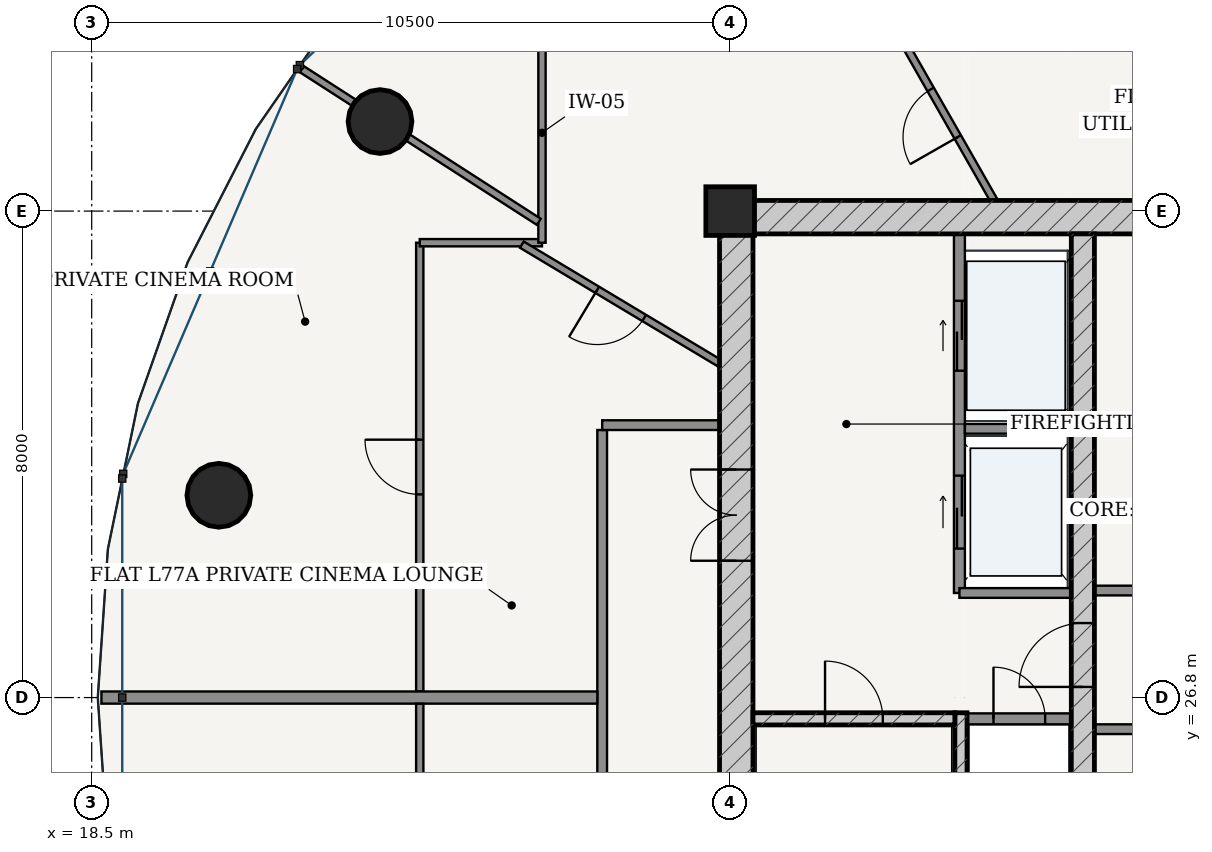
"""IFC4 building model, lengths in metres.
Left out: names, types, materials, properties, quantities, classifications, styles, units other than length and angle.
Written with IfcOpenShell. Run it as: python <this file> out.ifc"""

import sys

from ifc_helpers import new_model, si_unit, direction, frame, frame_2d, origin, origin_2d, place, context, subcontext, project, spatial, rectangle, hollow_circle, extrude, source, transform, mapped, element, fill, save


model = new_model("IFC4")
c1 = context("Model", 3, precision=1e-05, world=origin(), true_north=direction((-0.2419218956, 0.970295726276)))
c2 = subcontext(c1, "Body", "Model", "MODEL_VIEW")
j1 = project(units=[si_unit("LENGTHUNIT", "METRE"), si_unit("PLANEANGLEUNIT", "RADIAN")], contexts=[c1])
p1 = place(None, origin())
s1 = spatial("IfcSite", under=j1, at=p1, CompositionType="ELEMENT")
p2 = place(p1, origin())
s2 = spatial("IfcBuilding", under=s1, at=p2, CompositionType="ELEMENT")
p3 = place(p2, frame((0.0, 0.0, 293.2)))
s3 = spatial("IfcBuildingStorey", under=s2, at=p3, CompositionType="ELEMENT", Elevation=293.2)
p4 = place(p3, frame((29.0, 34.8, 0.0), z_axis=(0.0, 0.0, 1.0), x_axis=(1.0, 0.0, 0.0)))
e1 = element("IfcColumn", 1, at=p4, inside=s3, PredefinedType="COLUMN", context=c2, shape_type="SweptSolid", body=[
    extrude(rectangle(XDim=0.8, YDim=0.8, at=origin_2d()), origin(), (0.0, 0.0, 1.0), 3.75),
])
p5 = place(p3, frame((28.825, 34.7, 0.0), z_axis=(0.0, 0.0, 1.0), x_axis=(1.0, 0.0, 0.0)))
e2 = element("IfcWall", 2, at=p5, inside=s3, PredefinedType="SHEAR", context=c2, shape_type="SweptSolid", body=[
    extrude(rectangle(XDim=18.35, YDim=0.55, at=frame_2d((9.175, 0.0))), origin(), (0.0, 0.0, 1.0), 3.49),
])
p6 = place(p3, frame((29.1, 19.175, 0.0), z_axis=(0.0, 0.0, 1.0), x_axis=(0.0, 1.0, 0.0)))
e3 = element("IfcWall", 3, at=p6, inside=s3, PredefinedType="SHEAR", context=c2, shape_type="SweptSolid", body=[
    extrude(rectangle(XDim=15.25, YDim=0.55, at=frame_2d((7.625, 0.0))), origin(), (0.0, 0.0, 1.0), 3.49),
])
p7 = place(p6, frame((9.875, 0.0, 0.0)))
e4 = element("IfcOpeningElement", 4, at=p7, cuts=e3, PredefinedType="OPENING", context=c2, shape_type="SweptSolid", body=[
    extrude(rectangle(XDim=1.5, YDim=2.2, at=frame_2d((0.75, 1.1))), frame((0.0, 0.285, 0.0), z_axis=(0.0, -1.0, 0.0), x_axis=(1.0, 0.0, 0.0)), (0.0, 0.0, 1.0), 0.57),
])
p8 = place(p3, frame((32.795, 19.175, 0.0), z_axis=(0.0, 0.0, 1.0), x_axis=(0.0, 1.0, 0.0)))
e5 = element("IfcWall", 5, at=p8, inside=s3, PredefinedType="SOLIDWALL", context=c2, shape_type="SweptSolid", body=[
    extrude(rectangle(XDim=7.375, YDim=0.2, at=frame_2d((3.688, 0.0))), origin(), (0.0, 0.0, 1.0), 3.49),
])
p9 = place(p3, frame((29.375, 26.45, 0.0), z_axis=(0.0, 0.0, 1.0), x_axis=(1.0, 0.0, 0.0)))
e6 = element("IfcWall", 6, at=p9, inside=s3, PredefinedType="SOLIDWALL", context=c2, shape_type="SweptSolid", body=[
    extrude(rectangle(XDim=3.32, YDim=0.2, at=frame_2d((1.66, 0.0))), origin(), (0.0, 0.0, 1.0), 3.49),
])
p10 = place(p9, frame((1.185, 0.0, 0.0)))
e7 = element("IfcOpeningElement", 7, at=p10, cuts=e6, PredefinedType="OPENING", context=c2, shape_type="SweptSolid", body=[
    extrude(rectangle(XDim=0.95, YDim=2.15, at=frame_2d((0.475, 1.075))), frame((0.0, 0.11, 0.0), z_axis=(0.0, -1.0, 0.0), x_axis=(1.0, 0.0, 0.0)), (0.0, 0.0, 1.0), 0.22),
])
p11 = place(p3, frame((34.8, 19.175, 0.0), z_axis=(0.0, 0.0, 1.0), x_axis=(0.0, 1.0, 0.0)))
e8 = element("IfcWall", 8, at=p11, inside=s3, PredefinedType="SHEAR", context=c2, shape_type="SweptSolid", body=[
    extrude(rectangle(XDim=15.25, YDim=0.38, at=frame_2d((7.625, 0.0))), origin(), (0.0, 0.0, 1.0), 3.49),
])
p12 = place(p11, frame((7.8, 0.0, 0.0)))
e9 = element("IfcOpeningElement", 9, at=p12, cuts=e8, PredefinedType="OPENING", context=c2, shape_type="SweptSolid", body=[
    extrude(rectangle(XDim=1.05, YDim=2.15, at=frame_2d((0.525, 1.075))), frame((0.0, 0.2, 0.0), z_axis=(0.0, -1.0, 0.0), x_axis=(1.0, 0.0, 0.0)), (0.0, 0.0, 1.0), 0.4),
])
for number, where, z_axis, x_axis in (
    (10, (23.241, 36.272, 0.0), (0.0, 0.0, 1.0), (1.0, 0.0, 0.0)),
    (11, (20.591, 30.126, 0.0), (0.0, 0.0, 1.0), (1.0, 0.0, 0.0)),
):
    element("IfcColumn", number, at=place(p3, frame(where, z_axis=z_axis, x_axis=x_axis)), inside=s3, PredefinedType="COLUMN", context=c2, shape_type="SweptSolid", body=[
        extrude(hollow_circle(Radius=0.525, WallThickness=0.035, at=origin_2d()), origin(), (0.0, 0.0, 1.0), 3.75),
    ])
p13 = place(p3, frame((32.9, 26.45, 0.0), z_axis=(0.0, 0.0, 1.0), x_axis=(1.0, 0.0, 0.0)))
e12 = element("IfcWall", 12, at=p13, inside=s3, PredefinedType="PARTITIONING", context=c2, shape_type="SweptSolid", body=[
    extrude(rectangle(XDim=1.71, YDim=0.18, at=frame_2d((0.855, 0.0))), origin(), (0.0, 0.0, 1.0), 3.49),
])
p14 = place(p13, frame((0.43, 0.0, 0.0)))
e13 = element("IfcOpeningElement", 13, at=p14, cuts=e12, PredefinedType="OPENING", context=c2, shape_type="SweptSolid", body=[
    extrude(rectangle(XDim=0.85, YDim=2.1, at=frame_2d((0.425, 1.05))), frame((0.0, 0.1, 0.0), z_axis=(0.0, -1.0, 0.0), x_axis=(1.0, 0.0, 0.0)), (0.0, 0.0, 1.0), 0.2),
])
p15 = place(p3, frame((32.77, 28.52, 0.0), z_axis=(0.0, 0.0, 1.0), x_axis=(0.0, 1.0, 0.0)))
e14 = element("IfcWall", 14, at=p15, inside=s3, PredefinedType="PARTITIONING", context=c2, shape_type="SweptSolid", body=[
    extrude(rectangle(XDim=5.905, YDim=0.18, at=frame_2d((2.953, 0.0))), origin(), (0.0, 0.0, 1.0), 3.49),
])
p16 = place(p15, frame((3.655, 0.0, 0.0)))
e15 = element("IfcOpeningElement", 15, at=p16, cuts=e14, PredefinedType="OPENING", context=c2, shape_type="SweptSolid", body=[
    extrude(rectangle(XDim=1.15, YDim=2.2, at=frame_2d((0.575, 1.1))), frame((0.0, 0.1, 0.0), z_axis=(0.0, -1.0, 0.0), x_axis=(1.0, 0.0, 0.0)), (0.0, 0.0, 1.0), 0.2),
])
p17 = place(p15, frame((0.73, 0.0, 0.0)))
e16 = element("IfcOpeningElement", 16, at=p17, cuts=e14, PredefinedType="OPENING", context=c2, shape_type="SweptSolid", body=[
    extrude(rectangle(XDim=1.2, YDim=2.25, at=frame_2d((0.6, 1.125))), frame((0.0, 0.1, 0.0), z_axis=(0.0, -1.0, 0.0), x_axis=(1.0, 0.0, 0.0)), (0.0, 0.0, 1.0), 0.2),
])
p18 = place(p3, frame((32.86, 31.22, 0.0), z_axis=(0.0, 0.0, 1.0), x_axis=(1.0, 0.0, 0.0)))
e17 = element("IfcWall", 17, at=p18, inside=s3, PredefinedType="PARTITIONING", context=c2, shape_type="SweptSolid", body=[
    extrude(rectangle(XDim=1.75, YDim=0.16, at=frame_2d((0.875, 0.0))), origin(), (0.0, 0.0, 1.0), 3.49),
])
p19 = place(p3, frame((32.77, 28.52, 0.0), z_axis=(0.0, 0.0, 1.0), x_axis=(1.0, 0.0, 0.0)))
e18 = element("IfcWall", 18, at=p19, inside=s3, PredefinedType="PARTITIONING", context=c2, shape_type="SweptSolid", body=[
    extrude(rectangle(XDim=1.84, YDim=0.16, at=frame_2d((0.92, 0.0))), origin(), (0.0, 0.0, 1.0), 3.49),
])
p20 = place(p3, frame((34.99, 28.56, 0.0), z_axis=(0.0, 0.0, 1.0), x_axis=(1.0, 0.0, 0.0)))
e19 = element("IfcWall", 19, at=p20, inside=s3, PredefinedType="PARTITIONING", context=c2, shape_type="SweptSolid", body=[
    extrude(rectangle(XDim=6.02, YDim=0.16, at=frame_2d((3.01, 0.0))), origin(), (0.0, 0.0, 1.0), 3.49),
])
p21 = place(p20, frame((2.585, 0.0, 0.0)))
e20 = element("IfcOpeningElement", 20, at=p21, cuts=e19, PredefinedType="OPENING", context=c2, shape_type="SweptSolid", body=[
    extrude(rectangle(XDim=0.85, YDim=2.1, at=frame_2d((0.425, 1.05))), frame((0.0, 0.09, 0.0), z_axis=(0.0, -1.0, 0.0), x_axis=(1.0, 0.0, 0.0)), (0.0, 0.0, 1.0), 0.18),
])
p22 = place(p3, frame((34.99, 26.28, 0.0), z_axis=(0.0, 0.0, 1.0), x_axis=(1.0, 0.0, 0.0)))
e21 = element("IfcWall", 21, at=p22, inside=s3, PredefinedType="PARTITIONING", context=c2, shape_type="SweptSolid", body=[
    extrude(rectangle(XDim=6.02, YDim=0.16, at=frame_2d((3.01, 0.0))), origin(), (0.0, 0.0, 1.0), 3.49),
])
p23 = place(p22, frame((1.045, 0.0, 0.0)))
e22 = element("IfcOpeningElement", 22, at=p23, cuts=e21, PredefinedType="OPENING", context=c2, shape_type="SweptSolid", body=[
    extrude(rectangle(XDim=0.85, YDim=2.1, at=frame_2d((0.425, 1.05))), frame((0.0, 0.09, 0.0), z_axis=(0.0, -1.0, 0.0), x_axis=(1.0, 0.0, 0.0)), (0.0, 0.0, 1.0), 0.18),
])
p24 = place(p22, frame((3.215, 0.0, 0.0)))
e23 = element("IfcOpeningElement", 23, at=p24, cuts=e21, PredefinedType="OPENING", context=c2, shape_type="SweptSolid", body=[
    extrude(rectangle(XDim=1.1, YDim=2.2, at=frame_2d((0.55, 1.1))), frame((0.0, 0.09, 0.0), z_axis=(0.0, -1.0, 0.0), x_axis=(1.0, 0.0, 0.0)), (0.0, 0.0, 1.0), 0.18),
])
p25 = place(p22, frame((4.695, 0.0, 0.0)))
e24 = element("IfcOpeningElement", 24, at=p25, cuts=e21, PredefinedType="OPENING", context=c2, shape_type="SweptSolid", body=[
    extrude(rectangle(XDim=1.1, YDim=2.2, at=frame_2d((0.55, 1.1))), frame((0.0, 0.09, 0.0), z_axis=(0.0, -1.0, 0.0), x_axis=(1.0, 0.0, 0.0)), (0.0, 0.0, 1.0), 0.18),
])
p26 = place(p3, frame((26.895, 17.275, 0.0), z_axis=(0.0, 0.0, 1.0), x_axis=(0.0, 1.0, 0.0)))
e25 = element("IfcWall", 25, at=p26, inside=s3, PredefinedType="PARTITIONING", context=c2, shape_type="SweptSolid", body=[
    extrude(rectangle(XDim=13.925, YDim=0.16, at=frame_2d((6.962, 0.0))), origin(), (0.0, 0.0, 1.0), 3.015),
])
p27 = place(p3, frame((26.895, 31.28, 0.0), z_axis=(0.0, 0.0, 1.0), x_axis=(1.0, 0.0, 0.0)))
e26 = element("IfcWall", 26, at=p27, inside=s3, PredefinedType="PARTITIONING", context=c2, shape_type="SweptSolid", body=[
    extrude(rectangle(XDim=1.93, YDim=0.16, at=frame_2d((0.965, 0.0))), origin(), (0.0, 0.0, 1.0), 3.49),
])
p28 = place(p3, frame((23.895, 26.902, 0.0), z_axis=(0.0, 0.0, 1.0), x_axis=(0.0, 1.0, 0.0)))
e27 = element("IfcWall", 27, at=p28, inside=s3, PredefinedType="PARTITIONING", context=c2, shape_type="SweptSolid", body=[
    extrude(rectangle(XDim=7.378, YDim=0.12, at=frame_2d((3.689, 0.0))), origin(), (0.0, 0.0, 1.0), 3.015),
])
p29 = place(p28, frame((3.239, 0.0, 0.0)))
e28 = element("IfcOpeningElement", 28, at=p29, cuts=e27, PredefinedType="OPENING", context=c2, shape_type="SweptSolid", body=[
    extrude(rectangle(XDim=0.9, YDim=2.15, at=frame_2d((0.45, 1.075))), frame((0.0, 0.07, 0.0), z_axis=(0.0, -1.0, 0.0), x_axis=(1.0, 0.0, 0.0)), (0.0, 0.0, 1.0), 0.14),
])
p30 = place(p3, frame((23.895, 34.28, 0.0), z_axis=(0.0, 0.0, 1.0), x_axis=(1.0, 0.0, 0.0)))
e29 = element("IfcWall", 29, at=p30, inside=s3, PredefinedType="PARTITIONING", context=c2, shape_type="SweptSolid", body=[
    extrude(rectangle(XDim=2.01, YDim=0.12, at=frame_2d((1.005, 0.0))), origin(), (0.0, 0.0, 1.0), 3.209),
])
p31 = place(p3, frame((25.905, 34.28, 0.0), z_axis=(0.0, 0.0, 1.0), x_axis=(0.0, 1.0, 0.0)))
e30 = element("IfcWall", 30, at=p31, inside=s3, PredefinedType="PARTITIONING", context=c2, shape_type="SweptSolid", body=[
    extrude(rectangle(XDim=3.615, YDim=0.12, at=frame_2d((1.808, 0.0))), origin(), (0.0, 0.0, 1.0), 3.015),
])
p32 = place(p3, frame((25.853, 34.624, 0.0), z_axis=(0.0, 0.0, 1.0), x_axis=(-0.840694066929, 0.541510374628, 0.0)))
e31 = element("IfcWall", 31, at=p32, inside=s3, PredefinedType="PARTITIONING", context=c2, shape_type="SweptSolid", body=[
    extrude(rectangle(XDim=4.637, YDim=0.12, at=frame_2d((2.319, 0.0))), origin(), (0.0, 0.0, 1.0), 3.015),
])
p33 = place(p3, frame((33.336, 34.977, 0.0), z_axis=(0.0, 0.0, 1.0), x_axis=(-0.495413156231, 0.86865747256, 0.0)))
e32 = element("IfcWall", 32, at=p33, inside=s3, PredefinedType="PARTITIONING", context=c2, shape_type="SweptSolid", body=[
    extrude(rectangle(XDim=3.297, YDim=0.12, at=frame_2d((1.649, 0.0))), origin(), (0.0, 0.0, 1.0), 3.49),
])
p34 = place(p33, frame((1.199, 0.0, 0.0)))
e33 = element("IfcOpeningElement", 33, at=p34, cuts=e32, PredefinedType="OPENING", context=c2, shape_type="SweptSolid", body=[
    extrude(rectangle(XDim=0.9, YDim=2.15, at=frame_2d((0.45, 1.075))), frame((0.0, 0.07, 0.0), z_axis=(0.0, -1.0, 0.0), x_axis=(1.0, 0.0, 0.0)), (0.0, 0.0, 1.0), 0.14),
])
p35 = place(p3, frame((28.825, 32.3, 0.0), z_axis=(0.0, 0.0, 1.0), x_axis=(-0.857737223377, 0.514088373369, 0.0)))
e34 = element("IfcWall", 34, at=p35, inside=s3, PredefinedType="PARTITIONING", context=c2, shape_type="SweptSolid", body=[
    extrude(rectangle(XDim=3.79, YDim=0.12, at=frame_2d((1.895, 0.0))), origin(), (0.0, 0.0, 1.0), 3.209),
])
p36 = place(p35, frame((1.445, 0.0, 0.0)))
e35 = element("IfcOpeningElement", 35, at=p36, cuts=e34, PredefinedType="OPENING", context=c2, shape_type="SweptSolid", body=[
    extrude(rectangle(XDim=0.9, YDim=2.15, at=frame_2d((0.45, 1.075))), frame((0.0, 0.07, 0.0), z_axis=(0.0, -1.0, 0.0), x_axis=(1.0, 0.0, 0.0)), (0.0, 0.0, 1.0), 0.14),
])
p37 = place(p3, frame((26.815, 26.8, 0.0), z_axis=(0.0, 0.0, 1.0), x_axis=(-1.0, 0.0, 0.0)))
e36 = element("IfcWall", 36, at=p37, inside=s3, PredefinedType="PARTITIONING", context=c2, shape_type="SweptSolid", body=[
    extrude(rectangle(XDim=8.155, YDim=0.2, at=frame_2d((4.078, 0.0))), origin(), (0.0, 0.0, 1.0), 3.121),
])
p38 = place(p3, frame((23.895, 14.388, 0.0), z_axis=(0.0, 0.0, 1.0), x_axis=(0.0, 1.0, 0.0)))
e37 = element("IfcWall", 37, at=p38, inside=s3, PredefinedType="PARTITIONING", context=c2, shape_type="SweptSolid", body=[
    extrude(rectangle(XDim=12.31, YDim=0.12, at=frame_2d((6.155, 0.0))), origin(), (0.0, 0.0, 1.0), 3.015),
])
p39 = place(p38, frame((4.367, 0.0, 0.0)))
e38 = element("IfcOpeningElement", 38, at=p39, cuts=e37, PredefinedType="OPENING", context=c2, shape_type="SweptSolid", body=[
    extrude(rectangle(XDim=0.9, YDim=2.15, at=frame_2d((0.45, 1.075))), frame((0.0, 0.07, 0.0), z_axis=(0.0, -1.0, 0.0), x_axis=(1.0, 0.0, 0.0)), (0.0, 0.0, 1.0), 0.14),
])
m1 = source(origin(), c2, "Body", "SweptSolid", [
    extrude(rectangle(XDim=1.5, YDim=2.2, at=frame_2d((0.75, 1.1))), frame((0.0, 0.025, 0.0), z_axis=(0.0, -1.0, 0.0), x_axis=(1.0, 0.0, 0.0)), (0.0, 0.0, 1.0), 0.05),
])
p40 = place(p7, origin())
e39 = element("IfcDoor", 39, at=p40, inside=s3, OperationType="DOUBLE_DOOR_SINGLE_SWING", PredefinedType="DOOR", context=c2, shape_type="MappedRepresentation", body=[
    mapped(m1, transform((0.0, 0.0, 0.0), scale=1.0)),
])
fill(e4, e39)
m2 = source(origin(), c2, "Body", "SweptSolid", [
    extrude(rectangle(XDim=1.05, YDim=2.15, at=frame_2d((0.525, 1.075))), frame((0.0, 0.025, 0.0), z_axis=(0.0, -1.0, 0.0), x_axis=(1.0, 0.0, 0.0)), (0.0, 0.0, 1.0), 0.05),
])
p41 = place(p12, origin())
e40 = element("IfcDoor", 40, at=p41, inside=s3, OperationType="SINGLE_SWING_LEFT", PredefinedType="DOOR", context=c2, shape_type="MappedRepresentation", body=[
    mapped(m2, transform((0.0, 0.0, 0.0), scale=1.0)),
])
fill(e9, e40)
m3 = source(origin(), c2, "Body", "SweptSolid", [
    extrude(rectangle(XDim=0.95, YDim=2.15, at=frame_2d((0.475, 1.075))), frame((0.0, 0.025, 0.0), z_axis=(0.0, -1.0, 0.0), x_axis=(1.0, 0.0, 0.0)), (0.0, 0.0, 1.0), 0.05),
])
p42 = place(p10, origin())
e41 = element("IfcDoor", 41, at=p42, inside=s3, OperationType="SINGLE_SWING_LEFT", PredefinedType="DOOR", context=c2, shape_type="MappedRepresentation", body=[
    mapped(m3, transform((0.0, 0.0, 0.0), scale=1.0)),
])
fill(e7, e41)
m4 = source(origin(), c2, "Body", "SweptSolid", [
    extrude(rectangle(XDim=0.85, YDim=2.1, at=frame_2d((0.425, 1.05))), frame((0.0, 0.025, 0.0), z_axis=(0.0, -1.0, 0.0), x_axis=(1.0, 0.0, 0.0)), (0.0, 0.0, 1.0), 0.05),
])
p43 = place(p14, origin())
e42 = element("IfcDoor", 42, at=p43, inside=s3, OperationType="SINGLE_SWING_LEFT", PredefinedType="DOOR", context=c2, shape_type="MappedRepresentation", body=[
    mapped(m4, transform((0.0, 0.0, 0.0), scale=1.0)),
])
fill(e13, e42)
m5 = source(origin(), c2, "Body", "SweptSolid", [
    extrude(rectangle(XDim=1.15, YDim=2.2, at=frame_2d((0.575, 1.1))), frame((0.0, 0.025, 0.0), z_axis=(0.0, -1.0, 0.0), x_axis=(1.0, 0.0, 0.0)), (0.0, 0.0, 1.0), 0.05),
])
p44 = place(p16, origin())
e43 = element("IfcDoor", 43, at=p44, inside=s3, OperationType="DOUBLE_DOOR_SLIDING", PredefinedType="DOOR", context=c2, shape_type="MappedRepresentation", body=[
    mapped(m5, transform((0.0, 0.0, 0.0), scale=1.0)),
])
fill(e15, e43)
m6 = source(origin(), c2, "Body", "SweptSolid", [
    extrude(rectangle(XDim=1.2, YDim=2.25, at=frame_2d((0.6, 1.125))), frame((0.0, 0.025, 0.0), z_axis=(0.0, -1.0, 0.0), x_axis=(1.0, 0.0, 0.0)), (0.0, 0.0, 1.0), 0.05),
])
p45 = place(p17, origin())
e44 = element("IfcDoor", 44, at=p45, inside=s3, OperationType="DOUBLE_DOOR_SLIDING", PredefinedType="DOOR", context=c2, shape_type="MappedRepresentation", body=[
    mapped(m6, transform((0.0, 0.0, 0.0), scale=1.0)),
])
fill(e16, e44)
m7 = source(origin(), c2, "Body", "SweptSolid", [
    extrude(rectangle(XDim=0.9, YDim=2.15, at=frame_2d((0.45, 1.075))), frame((0.0, 0.025, 0.0), z_axis=(0.0, -1.0, 0.0), x_axis=(1.0, 0.0, 0.0)), (0.0, 0.0, 1.0), 0.05),
])
p46 = place(p34, origin())
e45 = element("IfcDoor", 45, at=p46, inside=s3, OperationType="SINGLE_SWING_LEFT", PredefinedType="DOOR", context=c2, shape_type="MappedRepresentation", body=[
    mapped(m7, transform((0.0, 0.0, 0.0), scale=1.0)),
])
fill(e33, e45)
p47 = place(p36, origin())
e46 = element("IfcDoor", 46, at=p47, inside=s3, OperationType="SINGLE_SWING_RIGHT", PredefinedType="DOOR", context=c2, shape_type="MappedRepresentation", body=[
    mapped(m7, transform((0.0, 0.0, 0.0), scale=1.0)),
])
fill(e35, e46)
p48 = place(p29, origin())
e47 = element("IfcDoor", 47, at=p48, inside=s3, OperationType="SINGLE_SWING_RIGHT", PredefinedType="DOOR", context=c2, shape_type="MappedRepresentation", body=[
    mapped(m7, transform((0.0, 0.0, 0.0), scale=1.0)),
])
fill(e28, e47)
save(model, sys.argv[1])
